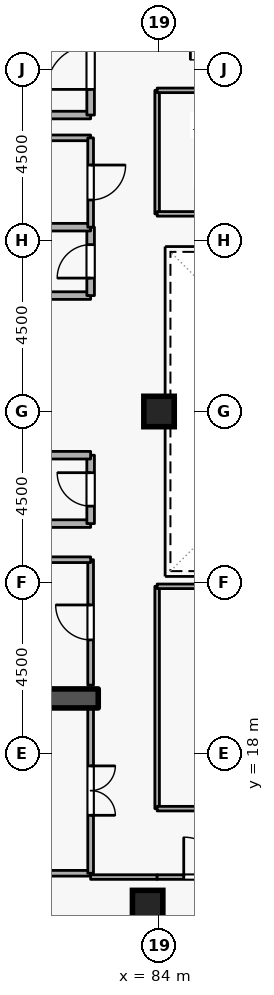
"""IFC4 building model, lengths in metres.
Left out: names, types, materials, properties, quantities, classifications, styles, units other than length and angle.
Written with IfcOpenShell. Run it as: python <this file> out.ifc"""

import sys

from ifc_helpers import new_model, si_unit, direction, frame, frame_2d, origin, origin_2d, place, context, subcontext, project, spatial, rectangle, extrude, element, fill, save


model = new_model("IFC4")
c1 = context("Model", 3, precision=1e-05, world=origin(), true_north=direction((0.0, 1.0)))
c2 = subcontext(c1, "Body", "Model", "MODEL_VIEW")
j1 = project(units=[si_unit("LENGTHUNIT", "METRE"), si_unit("PLANEANGLEUNIT", "RADIAN")], contexts=[c1])
p1 = place(None, origin())
s1 = spatial("IfcSite", under=j1, at=p1, CompositionType="ELEMENT")
p2 = place(p1, origin())
s2 = spatial("IfcBuilding", under=s1, at=p2, CompositionType="ELEMENT")
p3 = place(p2, frame((0.0, 0.0, 261.9)))
s3 = spatial("IfcBuildingStorey", under=s2, at=p3, CompositionType="ELEMENT", Elevation=261.9)
p4 = place(p3, frame((76.6, 19.45, 0.0), z_axis=(0.0, 0.0, 1.0), x_axis=(1.0, 0.0, 0.0)))
e1 = element("IfcWall", 1, at=p4, inside=s3, PredefinedType="SHEAR", context=c2, shape_type="SweptSolid", body=[
    extrude(rectangle(XDim=5.8, YDim=0.5, at=frame_2d((2.9, 0.0))), origin(), (0.0, 0.0, 1.0), 3.6),
])
for number, where, z_axis, x_axis in (
    (2, (83.7, 14.0, 0.0), (0.0, 0.0, 1.0), (1.0, 0.0, 0.0)),
    (3, (84.0, 27.0, 0.0), (0.0, 0.0, 1.0), (1.0, 0.0, 0.0)),
):
    element("IfcColumn", number, at=place(p3, frame(where, z_axis=z_axis, x_axis=x_axis)), inside=s3, PredefinedType="COLUMN", context=c2, shape_type="SweptSolid", body=[
        extrude(rectangle(XDim=0.8, YDim=0.8, at=origin_2d()), origin(), (0.0, 0.0, 1.0), 3.6),
    ])
p5 = place(p3, frame((79.9, 34.8, 0.0), z_axis=(0.0, 0.0, 1.0), x_axis=(1.0, 0.0, 0.0)))
e4 = element("IfcWall", 4, at=p5, inside=s3, PredefinedType="STANDARD", context=c2, shape_type="SweptSolid", body=[
    extrude(rectangle(XDim=2.3, YDim=0.2, at=frame_2d((1.15, 0.0))), origin(), (0.0, 0.0, 1.0), 2.545),
])
p6 = place(p3, frame((82.2, 34.8, 0.0), z_axis=(0.0, 0.0, 1.0), x_axis=(0.0, 1.0, 0.0)))
e5 = element("IfcWall", 5, at=p6, inside=s3, PredefinedType="STANDARD", context=c2, shape_type="SweptSolid", body=[
    extrude(rectangle(XDim=2.5, YDim=0.2, at=frame_2d((1.25, 0.0))), origin(), (0.0, 0.0, 1.0), 3.34),
])
p7 = place(p6, frame((0.675, 0.0, 0.0)))
e6 = element("IfcOpeningElement", 6, at=p7, cuts=e5, PredefinedType="OPENING", context=c2, shape_type="SweptSolid", body=[
    extrude(rectangle(XDim=1.15, YDim=2.1, at=frame_2d((0.575, 1.05))), frame((0.0, 0.11, 0.0), z_axis=(0.0, -1.0, 0.0), x_axis=(1.0, 0.0, 0.0)), (0.0, 0.0, 1.0), 0.22),
])
p8 = place(p3, frame((80.15, 24.05, 0.0), z_axis=(0.0, 0.0, 1.0), x_axis=(1.0, 0.0, 0.0)))
e7 = element("IfcWall", 7, at=p8, inside=s3, PredefinedType="STANDARD", context=c2, shape_type="SweptSolid", body=[
    extrude(rectangle(XDim=2.05, YDim=0.2, at=frame_2d((1.025, 0.0))), origin(), (0.0, 0.0, 1.0), 3.34),
])
p9 = place(p3, frame((82.2, 24.05, 0.0), z_axis=(0.0, 0.0, 1.0), x_axis=(0.0, 1.0, 0.0)))
e8 = element("IfcWall", 8, at=p9, inside=s3, PredefinedType="STANDARD", context=c2, shape_type="SweptSolid", body=[
    extrude(rectangle(XDim=1.8, YDim=0.2, at=frame_2d((0.9, 0.0))), origin(), (0.0, 0.0, 1.0), 3.34),
])
p10 = place(p9, frame((0.46, 0.0, 0.0)))
e9 = element("IfcOpeningElement", 9, at=p10, cuts=e8, PredefinedType="OPENING", context=c2, shape_type="SweptSolid", body=[
    extrude(rectangle(XDim=0.88, YDim=2.04, at=frame_2d((0.44, 1.02))), frame((0.0, 0.11, 0.0), z_axis=(0.0, -1.0, 0.0), x_axis=(1.0, 0.0, 0.0)), (0.0, 0.0, 1.0), 0.22),
])
for number, where, z_axis, x_axis in (
    (10, (82.2, 25.85, 0.0), (0.0, 0.0, 1.0), (-1.0, 0.0, 0.0)),
    (11, (80.15, 30.05, 0.0), (0.0, 0.0, 1.0), (1.0, 0.0, 0.0)),
):
    element("IfcWall", number, at=place(p3, frame(where, z_axis=z_axis, x_axis=x_axis)), inside=s3, PredefinedType="STANDARD", context=c2, shape_type="SweptSolid", body=[
        extrude(rectangle(XDim=2.05, YDim=0.2, at=frame_2d((1.025, 0.0))), origin(), (0.0, 0.0, 1.0), 3.34),
    ])
p11 = place(p3, frame((82.2, 30.05, 0.0), z_axis=(0.0, 0.0, 1.0), x_axis=(0.0, 1.0, 0.0)))
e12 = element("IfcWall", 12, at=p11, inside=s3, PredefinedType="STANDARD", context=c2, shape_type="SweptSolid", body=[
    extrude(rectangle(XDim=1.8, YDim=0.2, at=frame_2d((0.9, 0.0))), origin(), (0.0, 0.0, 1.0), 3.34),
])
p12 = place(p11, frame((0.46, 0.0, 0.0)))
e13 = element("IfcOpeningElement", 13, at=p12, cuts=e12, PredefinedType="OPENING", context=c2, shape_type="SweptSolid", body=[
    extrude(rectangle(XDim=0.88, YDim=2.04, at=frame_2d((0.44, 1.02))), frame((0.0, 0.11, 0.0), z_axis=(0.0, -1.0, 0.0), x_axis=(1.0, 0.0, 0.0)), (0.0, 0.0, 1.0), 0.22),
])
p13 = place(p3, frame((82.2, 31.85, 0.0), z_axis=(0.0, 0.0, 1.0), x_axis=(-1.0, 0.0, 0.0)))
e14 = element("IfcWall", 14, at=p13, inside=s3, PredefinedType="STANDARD", context=c2, shape_type="SweptSolid", body=[
    extrude(rectangle(XDim=2.05, YDim=0.2, at=frame_2d((1.025, 0.0))), origin(), (0.0, 0.0, 1.0), 3.34),
])
p14 = place(p3, frame((82.2, 19.8, 0.0), z_axis=(0.0, 0.0, 1.0), x_axis=(0.0, 1.0, 0.0)))
e15 = element("IfcWall", 15, at=p14, inside=s3, PredefinedType="PARTITIONING", context=c2, shape_type="SweptSolid", body=[
    extrude(rectangle(XDim=3.3, YDim=0.15, at=frame_2d((1.65, 0.0))), origin(), (0.0, 0.0, 1.0), 3.34),
])
p15 = place(p14, frame((1.19, 0.0, 0.0)))
e16 = element("IfcOpeningElement", 16, at=p15, cuts=e15, PredefinedType="OPENING", context=c2, shape_type="SweptSolid", body=[
    extrude(rectangle(XDim=0.92, YDim=2.08, at=frame_2d((0.46, 1.04))), frame((0.0, 0.085, 0.0), z_axis=(0.0, -1.0, 0.0), x_axis=(1.0, 0.0, 0.0)), (0.0, 0.0, 1.0), 0.17),
])
p16 = place(p3, frame((82.2, 23.1, 0.0), z_axis=(0.0, 0.0, 1.0), x_axis=(-1.0, 0.0, 0.0)))
e17 = element("IfcWall", 17, at=p16, inside=s3, PredefinedType="PARTITIONING", context=c2, shape_type="SweptSolid", body=[
    extrude(rectangle(XDim=2.05, YDim=0.15, at=frame_2d((1.025, 0.0))), origin(), (0.0, 0.0, 1.0), 3.34),
])
p17 = place(p3, frame((80.15, 34.2, 0.0), z_axis=(0.0, 0.0, 1.0), x_axis=(1.0, 0.0, 0.0)))
e18 = element("IfcWall", 18, at=p17, inside=s3, PredefinedType="PARTITIONING", context=c2, shape_type="SweptSolid", body=[
    extrude(rectangle(XDim=2.05, YDim=0.15, at=frame_2d((1.025, 0.0))), origin(), (0.0, 0.0, 1.0), 2.545),
])
p18 = place(p3, frame((82.2, 34.2, 0.0), z_axis=(0.0, 0.0, 1.0), x_axis=(0.0, -1.0, 0.0)))
e19 = element("IfcWall", 19, at=p18, inside=s3, PredefinedType="PARTITIONING", context=c2, shape_type="SweptSolid", body=[
    extrude(rectangle(XDim=2.35, YDim=0.15, at=frame_2d((1.175, 0.0))), origin(), (0.0, 0.0, 1.0), 3.34),
])
p19 = place(p18, frame((0.715, 0.0, 0.0)))
e20 = element("IfcOpeningElement", 20, at=p19, cuts=e19, PredefinedType="OPENING", context=c2, shape_type="SweptSolid", body=[
    extrude(rectangle(XDim=0.92, YDim=2.08, at=frame_2d((0.46, 1.04))), frame((0.0, 0.085, 0.0), z_axis=(0.0, -1.0, 0.0), x_axis=(1.0, 0.0, 0.0)), (0.0, 0.0, 1.0), 0.17),
])
p20 = place(p3, frame((82.2, 14.85, 0.0), z_axis=(0.0, 0.0, 1.0), x_axis=(-1.0, 0.0, 0.0)))
e21 = element("IfcWall", 21, at=p20, inside=s3, PredefinedType="PARTITIONING", context=c2, shape_type="SweptSolid", body=[
    extrude(rectangle(XDim=11.42, YDim=0.15, at=frame_2d((5.71, 0.0))), origin(), (0.0, 0.0, 1.0), 3.34),
])
p21 = place(p3, frame((82.2, 19.2, 0.0), z_axis=(0.0, 0.0, 1.0), x_axis=(0.0, -1.0, 0.0)))
e22 = element("IfcWall", 22, at=p21, inside=s3, PredefinedType="PARTITIONING", context=c2, shape_type="SweptSolid", body=[
    extrude(rectangle(XDim=4.35, YDim=0.15, at=frame_2d((2.175, 0.0))), origin(), (0.0, 0.0, 1.0), 3.34),
])
p22 = place(p21, frame((1.525, 0.0, 0.0)))
e23 = element("IfcOpeningElement", 23, at=p22, cuts=e22, PredefinedType="OPENING", context=c2, shape_type="SweptSolid", body=[
    extrude(rectangle(XDim=1.3, YDim=2.12, at=frame_2d((0.65, 1.06))), frame((0.0, 0.085, 0.0), z_axis=(0.0, -1.0, 0.0), x_axis=(1.0, 0.0, 0.0)), (0.0, 0.0, 1.0), 0.17),
])
p23 = place(p3, frame((82.2, 14.75, 0.0), z_axis=(0.0, 0.0, 1.0), x_axis=(1.0, 0.0, 0.0)))
e24 = element("IfcWall", 24, at=p23, inside=s3, PredefinedType="PARTITIONING", context=c2, shape_type="SweptSolid", body=[
    extrude(rectangle(XDim=1.75, YDim=0.12, at=frame_2d((0.875, 0.0))), origin(), (0.0, 0.0, 1.0), 3.34),
])
p24 = place(p3, frame((83.95, 14.75, 0.0), z_axis=(0.0, 0.0, 1.0), x_axis=(1.0, 0.0, 0.0)))
e25 = element("IfcWall", 25, at=p24, inside=s3, PredefinedType="PARTITIONING", context=c2, shape_type="SweptSolid", body=[
    extrude(rectangle(XDim=2.45, YDim=0.12, at=frame_2d((1.225, 0.0))), origin(), (0.0, 0.0, 1.0), 3.34),
])
p25 = place(p24, frame((0.7, 0.0, 0.0)))
e26 = element("IfcOpeningElement", 26, at=p25, cuts=e25, PredefinedType="OPENING", context=c2, shape_type="SweptSolid", body=[
    extrude(rectangle(XDim=1.05, YDim=2.1, at=frame_2d((0.525, 1.05))), frame((0.0, 0.07, 0.0), z_axis=(0.0, -1.0, 0.0), x_axis=(1.0, 0.0, 0.0)), (0.0, 0.0, 1.0), 0.14),
])
p26 = place(p3, frame((83.95, 16.55, 0.0), z_axis=(0.0, 0.0, 1.0), x_axis=(0.0, 1.0, 0.0)))
e27 = element("IfcWall", 27, at=p26, inside=s3, PredefinedType="PARTITIONING", context=c2, shape_type="SweptSolid", body=[
    extrude(rectangle(XDim=5.85, YDim=0.12, at=frame_2d((2.925, 0.0))), origin(), (0.0, 0.0, 1.0), 3.34),
])
p27 = place(p3, frame((83.95, 22.4, 0.0), z_axis=(0.0, 0.0, 1.0), x_axis=(1.0, 0.0, 0.0)))
e28 = element("IfcWall", 28, at=p27, inside=s3, PredefinedType="PARTITIONING", context=c2, shape_type="SweptSolid", body=[
    extrude(rectangle(XDim=9.1, YDim=0.12, at=frame_2d((4.55, 0.0))), origin(), (0.0, 0.0, 1.0), 3.34),
])
p28 = place(p3, frame((93.05, 16.55, 0.0), z_axis=(0.0, 0.0, 1.0), x_axis=(-1.0, 0.0, 0.0)))
e29 = element("IfcWall", 29, at=p28, inside=s3, PredefinedType="PARTITIONING", context=c2, shape_type="SweptSolid", body=[
    extrude(rectangle(XDim=9.1, YDim=0.12, at=frame_2d((4.55, 0.0))), origin(), (0.0, 0.0, 1.0), 3.34),
])
p29 = place(p28, frame((4.075, 0.0, 0.0)))
e30 = element("IfcOpeningElement", 30, at=p29, cuts=e29, PredefinedType="OPENING", context=c2, shape_type="SweptSolid", body=[
    extrude(rectangle(XDim=0.95, YDim=2.1, at=frame_2d((0.475, 1.05))), frame((0.0, 0.07, 0.0), z_axis=(0.0, -1.0, 0.0), x_axis=(1.0, 0.0, 0.0)), (0.0, 0.0, 1.0), 0.14),
])
p30 = place(p3, frame((83.95, 32.2, 0.0), z_axis=(0.0, 0.0, 1.0), x_axis=(0.0, 1.0, 0.0)))
e31 = element("IfcWall", 31, at=p30, inside=s3, PredefinedType="PARTITIONING", context=c2, shape_type="SweptSolid", body=[
    extrude(rectangle(XDim=3.25, YDim=0.12, at=frame_2d((1.625, 0.0))), origin(), (0.0, 0.0, 1.0), 3.34),
])
p31 = place(p3, frame((83.95, 35.45, 0.0), z_axis=(0.0, 0.0, 1.0), x_axis=(1.0, 0.0, 0.0)))
e32 = element("IfcWall", 32, at=p31, inside=s3, PredefinedType="PARTITIONING", context=c2, shape_type="SweptSolid", body=[
    extrude(rectangle(XDim=9.1, YDim=0.12, at=frame_2d((4.55, 0.0))), origin(), (0.0, 0.0, 1.0), 3.34),
])
p32 = place(p31, frame((4.075, 0.0, 0.0)))
e33 = element("IfcOpeningElement", 33, at=p32, cuts=e32, PredefinedType="OPENING", context=c2, shape_type="SweptSolid", body=[
    extrude(rectangle(XDim=0.95, YDim=2.1, at=frame_2d((0.475, 1.05))), frame((0.0, 0.07, 0.0), z_axis=(0.0, -1.0, 0.0), x_axis=(1.0, 0.0, 0.0)), (0.0, 0.0, 1.0), 0.14),
])
p33 = place(p3, frame((93.05, 32.2, 0.0), z_axis=(0.0, 0.0, 1.0), x_axis=(-1.0, 0.0, 0.0)))
e34 = element("IfcWall", 34, at=p33, inside=s3, PredefinedType="PARTITIONING", context=c2, shape_type="SweptSolid", body=[
    extrude(rectangle(XDim=9.1, YDim=0.12, at=frame_2d((4.55, 0.0))), origin(), (0.0, 0.0, 1.0), 3.34),
])
p34 = place(p7, origin())
e35 = element("IfcDoor", 35, at=p34, inside=s3, OperationType="SINGLE_SWING_LEFT", PredefinedType="DOOR", context=c2, shape_type="SweptSolid", body=[
    extrude(rectangle(XDim=1.15, YDim=2.1, at=frame_2d((0.575, 1.05))), frame((0.0, 0.025, 0.0), z_axis=(0.0, -1.0, 0.0), x_axis=(1.0, 0.0, 0.0)), (0.0, 0.0, 1.0), 0.05),
])
fill(e6, e35)
p35 = place(p10, origin())
e36 = element("IfcDoor", 36, at=p35, inside=s3, OperationType="SINGLE_SWING_RIGHT", PredefinedType="DOOR", context=c2, shape_type="SweptSolid", body=[
    extrude(rectangle(XDim=0.88, YDim=2.04, at=frame_2d((0.44, 1.02))), frame((0.0, 0.025, 0.0), z_axis=(0.0, -1.0, 0.0), x_axis=(1.0, 0.0, 0.0)), (0.0, 0.0, 1.0), 0.05),
])
fill(e9, e36)
p36 = place(p12, origin())
e37 = element("IfcDoor", 37, at=p36, inside=s3, OperationType="SINGLE_SWING_LEFT", PredefinedType="DOOR", context=c2, shape_type="SweptSolid", body=[
    extrude(rectangle(XDim=0.88, YDim=2.04, at=frame_2d((0.44, 1.02))), frame((0.0, 0.025, 0.0), z_axis=(0.0, -1.0, 0.0), x_axis=(1.0, 0.0, 0.0)), (0.0, 0.0, 1.0), 0.05),
])
fill(e13, e37)
p37 = place(p15, origin())
e38 = element("IfcDoor", 38, at=p37, inside=s3, OperationType="SINGLE_SWING_RIGHT", PredefinedType="DOOR", context=c2, shape_type="SweptSolid", body=[
    extrude(rectangle(XDim=0.92, YDim=2.08, at=frame_2d((0.46, 1.04))), frame((0.0, 0.025, 0.0), z_axis=(0.0, -1.0, 0.0), x_axis=(1.0, 0.0, 0.0)), (0.0, 0.0, 1.0), 0.05),
])
fill(e16, e38)
p38 = place(p19, origin())
e39 = element("IfcDoor", 39, at=p38, inside=s3, OperationType="SINGLE_SWING_LEFT", PredefinedType="DOOR", context=c2, shape_type="SweptSolid", body=[
    extrude(rectangle(XDim=0.92, YDim=2.08, at=frame_2d((0.46, 1.04))), frame((0.0, 0.025, 0.0), z_axis=(0.0, -1.0, 0.0), x_axis=(1.0, 0.0, 0.0)), (0.0, 0.0, 1.0), 0.05),
])
fill(e20, e39)
p39 = place(p22, origin())
e40 = element("IfcDoor", 40, at=p39, inside=s3, OperationType="DOUBLE_DOOR_SINGLE_SWING", PredefinedType="DOOR", context=c2, shape_type="SweptSolid", body=[
    extrude(rectangle(XDim=1.3, YDim=2.12, at=frame_2d((0.65, 1.06))), frame((0.0, 0.025, 0.0), z_axis=(0.0, -1.0, 0.0), x_axis=(1.0, 0.0, 0.0)), (0.0, 0.0, 1.0), 0.05),
])
fill(e23, e40)
p40 = place(p25, origin())
e41 = element("IfcDoor", 41, at=p40, inside=s3, OperationType="SINGLE_SWING_LEFT", PredefinedType="DOOR", context=c2, shape_type="SweptSolid", body=[
    extrude(rectangle(XDim=1.05, YDim=2.1, at=frame_2d((0.525, 1.05))), frame((0.0, 0.025, 0.0), z_axis=(0.0, -1.0, 0.0), x_axis=(1.0, 0.0, 0.0)), (0.0, 0.0, 1.0), 0.05),
])
fill(e26, e41)
save(model, sys.argv[1])
